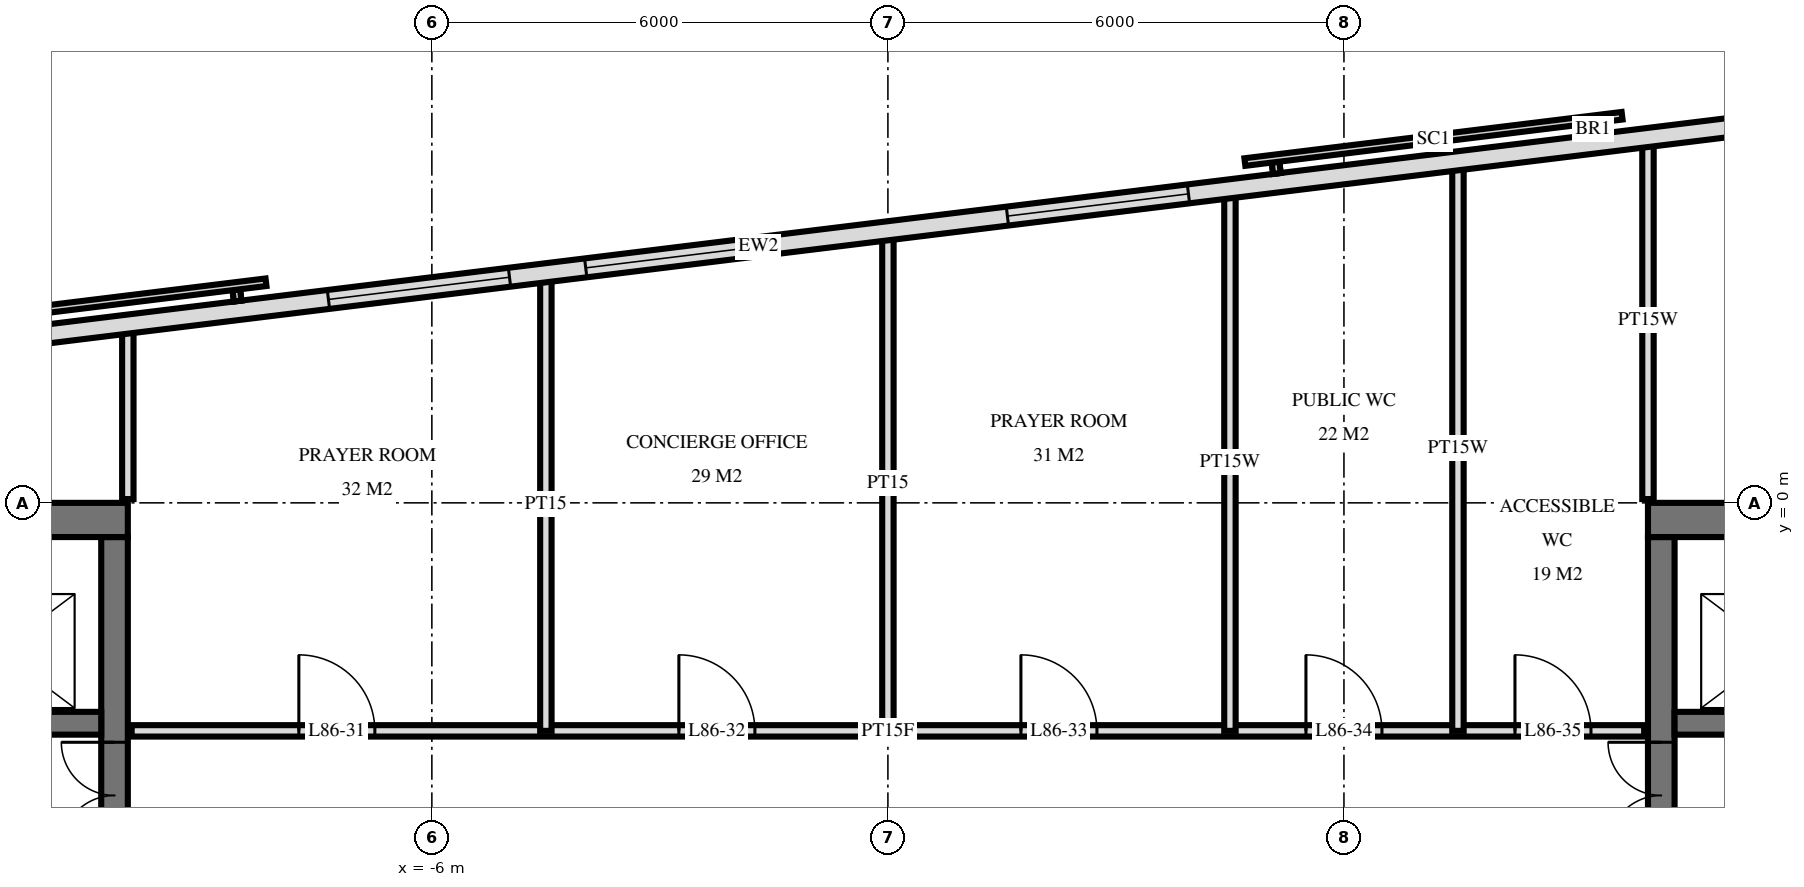
"""IFC4 building model, lengths in metres.
Left out: names, types, materials, properties, quantities, classifications, styles, units other than length and angle.
Written with IfcOpenShell. Run it as: python <this file> out.ifc"""

import sys

from ifc_helpers import new_model, si_unit, direction, frame, frame_2d, origin, place, context, subcontext, project, spatial, rectangle, extrude, element, fill, save


model = new_model("IFC4")
c1 = context("Model", 3, precision=1e-05, world=origin(), true_north=direction((0.0, 1.0)))
c2 = subcontext(c1, "Body", "Model", "MODEL_VIEW")
j1 = project(units=[si_unit("LENGTHUNIT", "METRE"), si_unit("PLANEANGLEUNIT", "RADIAN")], contexts=[c1])
p1 = place(None, origin())
s1 = spatial("IfcSite", under=j1, at=p1, CompositionType="ELEMENT")
p2 = place(p1, origin())
s2 = spatial("IfcBuilding", under=s1, at=p2, CompositionType="ELEMENT")
p3 = place(p2, frame((0.0, 0.0, 326.6)))
s3 = spatial("IfcBuildingStorey", under=s2, at=p3, CompositionType="ELEMENT", Elevation=326.6)
p4 = place(p3, frame((-19.5, -0.225, 0.0), z_axis=(0.0, 0.0, 1.0), x_axis=(1.0, 0.0, 0.0)))
e1 = element("IfcWall", 1, at=p4, inside=s3, PredefinedType="SHEAR", context=c2, shape_type="SweptSolid", body=[
    extrude(rectangle(XDim=9.5, YDim=0.45, at=frame_2d((4.75, 0.0))), origin(), (0.0, 0.0, 1.0), 4.0),
])
p5 = place(p3, frame((-10.175, -14.55, 0.0), z_axis=(0.0, 0.0, 1.0), x_axis=(0.0, 1.0, 0.0)))
e2 = element("IfcWall", 2, at=p5, inside=s3, PredefinedType="SHEAR", context=c2, shape_type="SweptSolid", body=[
    extrude(rectangle(XDim=14.1, YDim=0.35, at=frame_2d((7.05, 0.0))), origin(), (0.0, 0.0, 1.0), 4.0),
])
p6 = place(p5, frame((8.4, 0.0, 0.0)))
e3 = element("IfcOpeningElement", 3, at=p6, cuts=e2, PredefinedType="OPENING", context=c2, shape_type="SweptSolid", body=[
    extrude(rectangle(XDim=1.4, YDim=2.4, at=frame_2d((0.7, 1.2))), frame((0.0, 0.185, 0.0), z_axis=(0.0, -1.0, 0.0), x_axis=(1.0, 0.0, 0.0)), (0.0, 0.0, 1.0), 0.37),
])
p7 = place(p5, frame((10.0, 0.0, 0.0)))
e4 = element("IfcOpeningElement", 4, at=p7, cuts=e2, PredefinedType="OPENING", context=c2, shape_type="SweptSolid", body=[
    extrude(rectangle(XDim=1.4, YDim=2.4, at=frame_2d((0.7, 1.2))), frame((0.0, 0.185, 0.0), z_axis=(0.0, -1.0, 0.0), x_axis=(1.0, 0.0, 0.0)), (0.0, 0.0, 1.0), 0.37),
])
p8 = place(p5, frame((4.0, 0.0, 0.0)))
e5 = element("IfcOpeningElement", 5, at=p8, cuts=e2, PredefinedType="OPENING", context=c2, shape_type="SweptSolid", body=[
    extrude(rectangle(XDim=1.2, YDim=2.1, at=frame_2d((0.6, 1.05))), frame((0.0, 0.185, 0.0), z_axis=(0.0, -1.0, 0.0), x_axis=(1.0, 0.0, 0.0)), (0.0, 0.0, 1.0), 0.37),
])
p9 = place(p3, frame((-19.05, -2.9, 0.0), z_axis=(0.0, 0.0, 1.0), x_axis=(1.0, 0.0, 0.0)))
e6 = element("IfcWall", 6, at=p9, inside=s3, PredefinedType="SHEAR", context=c2, shape_type="SweptSolid", body=[
    extrude(rectangle(XDim=8.7, YDim=0.3, at=frame_2d((4.35, 0.0))), origin(), (0.0, 0.0, 1.0), 4.0),
])
p10 = place(p9, frame((6.8, 0.0, 0.0)))
e7 = element("IfcOpeningElement", 7, at=p10, cuts=e6, PredefinedType="OPENING", context=c2, shape_type="SweptSolid", body=[
    extrude(rectangle(XDim=1.1, YDim=2.1, at=frame_2d((0.55, 1.05))), frame((0.0, 0.16, 0.0), z_axis=(0.0, -1.0, 0.0), x_axis=(1.0, 0.0, 0.0)), (0.0, 0.0, 1.0), 0.32),
])
p11 = place(p9, frame((3.8, 0.0, 0.0)))
e8 = element("IfcOpeningElement", 8, at=p11, cuts=e6, PredefinedType="OPENING", context=c2, shape_type="SweptSolid", body=[
    extrude(rectangle(XDim=1.1, YDim=2.1, at=frame_2d((0.55, 1.05))), frame((0.0, 0.16, 0.0), z_axis=(0.0, -1.0, 0.0), x_axis=(1.0, 0.0, 0.0)), (0.0, 0.0, 1.0), 0.32),
])
p12 = place(p9, frame((0.9, 0.0, 0.0)))
e9 = element("IfcOpeningElement", 9, at=p12, cuts=e6, PredefinedType="OPENING", context=c2, shape_type="SweptSolid", body=[
    extrude(rectangle(XDim=0.9, YDim=2.1, at=frame_2d((0.45, 1.05))), frame((0.0, 0.16, 0.0), z_axis=(0.0, -1.0, 0.0), x_axis=(1.0, 0.0, 0.0)), (0.0, 0.0, 1.0), 0.32),
])
p13 = place(p3, frame((10.0, -0.225, 0.0), z_axis=(0.0, 0.0, 1.0), x_axis=(1.0, 0.0, 0.0)))
e10 = element("IfcWall", 10, at=p13, inside=s3, PredefinedType="SHEAR", context=c2, shape_type="SweptSolid", body=[
    extrude(rectangle(XDim=9.5, YDim=0.45, at=frame_2d((4.75, 0.0))), origin(), (0.0, 0.0, 1.0), 4.0),
])
p14 = place(p3, frame((10.175, -14.55, 0.0), z_axis=(0.0, 0.0, 1.0), x_axis=(0.0, 1.0, 0.0)))
e11 = element("IfcWall", 11, at=p14, inside=s3, PredefinedType="SHEAR", context=c2, shape_type="SweptSolid", body=[
    extrude(rectangle(XDim=14.1, YDim=0.35, at=frame_2d((7.05, 0.0))), origin(), (0.0, 0.0, 1.0), 4.0),
])
p15 = place(p14, frame((8.4, 0.0, 0.0)))
e12 = element("IfcOpeningElement", 12, at=p15, cuts=e11, PredefinedType="OPENING", context=c2, shape_type="SweptSolid", body=[
    extrude(rectangle(XDim=1.4, YDim=2.4, at=frame_2d((0.7, 1.2))), frame((0.0, 0.185, 0.0), z_axis=(0.0, -1.0, 0.0), x_axis=(1.0, 0.0, 0.0)), (0.0, 0.0, 1.0), 0.37),
])
p16 = place(p14, frame((10.0, 0.0, 0.0)))
e13 = element("IfcOpeningElement", 13, at=p16, cuts=e11, PredefinedType="OPENING", context=c2, shape_type="SweptSolid", body=[
    extrude(rectangle(XDim=1.4, YDim=2.4, at=frame_2d((0.7, 1.2))), frame((0.0, 0.185, 0.0), z_axis=(0.0, -1.0, 0.0), x_axis=(1.0, 0.0, 0.0)), (0.0, 0.0, 1.0), 0.37),
])
p17 = place(p14, frame((4.0, 0.0, 0.0)))
e14 = element("IfcOpeningElement", 14, at=p17, cuts=e11, PredefinedType="OPENING", context=c2, shape_type="SweptSolid", body=[
    extrude(rectangle(XDim=1.2, YDim=2.1, at=frame_2d((0.6, 1.05))), frame((0.0, 0.185, 0.0), z_axis=(0.0, -1.0, 0.0), x_axis=(1.0, 0.0, 0.0)), (0.0, 0.0, 1.0), 0.37),
])
p18 = place(p3, frame((10.35, -2.9, 0.0), z_axis=(0.0, 0.0, 1.0), x_axis=(1.0, 0.0, 0.0)))
e15 = element("IfcWall", 15, at=p18, inside=s3, PredefinedType="SHEAR", context=c2, shape_type="SweptSolid", body=[
    extrude(rectangle(XDim=8.7, YDim=0.3, at=frame_2d((4.35, 0.0))), origin(), (0.0, 0.0, 1.0), 4.0),
])
p19 = place(p18, frame((0.8, 0.0, 0.0)))
e16 = element("IfcOpeningElement", 16, at=p19, cuts=e15, PredefinedType="OPENING", context=c2, shape_type="SweptSolid", body=[
    extrude(rectangle(XDim=1.1, YDim=2.1, at=frame_2d((0.55, 1.05))), frame((0.0, 0.16, 0.0), z_axis=(0.0, -1.0, 0.0), x_axis=(1.0, 0.0, 0.0)), (0.0, 0.0, 1.0), 0.32),
])
p20 = place(p18, frame((3.8, 0.0, 0.0)))
e17 = element("IfcOpeningElement", 17, at=p20, cuts=e15, PredefinedType="OPENING", context=c2, shape_type="SweptSolid", body=[
    extrude(rectangle(XDim=1.1, YDim=2.1, at=frame_2d((0.55, 1.05))), frame((0.0, 0.16, 0.0), z_axis=(0.0, -1.0, 0.0), x_axis=(1.0, 0.0, 0.0)), (0.0, 0.0, 1.0), 0.32),
])
p21 = place(p18, frame((6.9, 0.0, 0.0)))
e18 = element("IfcOpeningElement", 18, at=p21, cuts=e15, PredefinedType="OPENING", context=c2, shape_type="SweptSolid", body=[
    extrude(rectangle(XDim=0.9, YDim=2.1, at=frame_2d((0.45, 1.05))), frame((0.0, 0.16, 0.0), z_axis=(0.0, -1.0, 0.0), x_axis=(1.0, 0.0, 0.0)), (0.0, 0.0, 1.0), 0.32),
])
p22 = place(p3, frame((16.138, 5.561, 0.0), z_axis=(0.0, 0.0, 1.0), x_axis=(-0.992546726876, -0.121864658405, 0.0)))
e19 = element("IfcWall", 19, at=p22, inside=s3, PredefinedType="SOLIDWALL", context=c2, shape_type="SweptSolid", body=[
    extrude(rectangle(XDim=35.951, YDim=0.25, at=frame_2d((17.975, 0.0))), origin(), (0.0, 0.0, 1.0), 3.72),
])
p23 = place(p22, frame((12.275, 0.0, 0.0)))
e20 = element("IfcOpeningElement", 20, at=p23, cuts=e19, PredefinedType="OPENING", context=c2, shape_type="SweptSolid", body=[
    extrude(rectangle(XDim=2.4, YDim=2.4, at=frame_2d((1.2, 1.2))), frame((0.0, 0.135, 0.0), z_axis=(0.0, -1.0, 0.0), x_axis=(1.0, 0.0, 0.0)), (0.0, 0.0, 1.0), 0.27),
])
p24 = place(p22, frame((17.865, 0.0, 0.0)))
e21 = element("IfcOpeningElement", 21, at=p24, cuts=e19, PredefinedType="OPENING", context=c2, shape_type="SweptSolid", body=[
    extrude(rectangle(XDim=2.4, YDim=2.4, at=frame_2d((1.2, 1.2))), frame((0.0, 0.135, 0.0), z_axis=(0.0, -1.0, 0.0), x_axis=(1.0, 0.0, 0.0)), (0.0, 0.0, 1.0), 0.27),
])
p25 = place(p22, frame((21.275, 0.0, 0.0)))
e22 = element("IfcOpeningElement", 22, at=p25, cuts=e19, PredefinedType="OPENING", context=c2, shape_type="SweptSolid", body=[
    extrude(rectangle(XDim=2.4, YDim=2.4, at=frame_2d((1.2, 1.2))), frame((0.0, 0.135, 0.0), z_axis=(0.0, -1.0, 0.0), x_axis=(1.0, 0.0, 0.0)), (0.0, 0.0, 1.0), 0.27),
])
p26 = place(p3, frame((10.0, 0.05, 0.0), z_axis=(0.0, 0.0, 1.0), x_axis=(0.0, 1.0, 0.0)))
e23 = element("IfcWall", 23, at=p26, inside=s3, PredefinedType="PLUMBINGWALL", context=c2, shape_type="SweptSolid", body=[
    extrude(rectangle(XDim=4.702, YDim=0.15, at=frame_2d((2.351, 0.0))), origin(), (0.0, 0.0, 1.0), 3.72),
])
p27 = place(p3, frame((7.5, -3.0, 0.0), z_axis=(0.0, 0.0, 1.0), x_axis=(0.0, 1.0, 0.0)))
e24 = element("IfcWall", 24, at=p27, inside=s3, PredefinedType="PLUMBINGWALL", context=c2, shape_type="SweptSolid", body=[
    extrude(rectangle(XDim=7.445, YDim=0.15, at=frame_2d((3.723, 0.0))), origin(), (0.0, 0.0, 1.0), 3.72),
])
p28 = place(p3, frame((4.5, -3.0, 0.0), z_axis=(0.0, 0.0, 1.0), x_axis=(0.0, 1.0, 0.0)))
e25 = element("IfcWall", 25, at=p28, inside=s3, PredefinedType="PLUMBINGWALL", context=c2, shape_type="SweptSolid", body=[
    extrude(rectangle(XDim=7.077, YDim=0.15, at=frame_2d((3.539, 0.0))), origin(), (0.0, 0.0, 1.0), 3.72),
])
p29 = place(p3, frame((0.0, -3.0, 0.0), z_axis=(0.0, 0.0, 1.0), x_axis=(0.0, 1.0, 0.0)))
e26 = element("IfcWall", 26, at=p29, inside=s3, PredefinedType="PARTITIONING", context=c2, shape_type="SweptSolid", body=[
    extrude(rectangle(XDim=6.524, YDim=0.15, at=frame_2d((3.262, 0.0))), origin(), (0.0, 0.0, 1.0), 3.72),
])
p30 = place(p3, frame((-4.5, -3.0, 0.0), z_axis=(0.0, 0.0, 1.0), x_axis=(0.0, 1.0, 0.0)))
e27 = element("IfcWall", 27, at=p30, inside=s3, PredefinedType="PARTITIONING", context=c2, shape_type="SweptSolid", body=[
    extrude(rectangle(XDim=5.972, YDim=0.15, at=frame_2d((2.986, 0.0))), origin(), (0.0, 0.0, 1.0), 3.72),
])
p31 = place(p3, frame((-10.0, 0.05, 0.0), z_axis=(0.0, 0.0, 1.0), x_axis=(0.0, 1.0, 0.0)))
e28 = element("IfcWall", 28, at=p31, inside=s3, PredefinedType="PARTITIONING", context=c2, shape_type="SweptSolid", body=[
    extrude(rectangle(XDim=2.247, YDim=0.15, at=frame_2d((1.123, 0.0))), origin(), (0.0, 0.0, 1.0), 3.72),
])
p32 = place(p3, frame((-9.95, -3.0, 0.0), z_axis=(0.0, 0.0, 1.0), x_axis=(1.0, 0.0, 0.0)))
e29 = element("IfcWall", 29, at=p32, inside=s3, PredefinedType="PARTITIONING", context=c2, shape_type="SweptSolid", body=[
    extrude(rectangle(XDim=19.9, YDim=0.15, at=frame_2d((9.95, 0.0))), origin(), (0.0, 0.0, 1.0), 3.72),
])
p33 = place(p32, frame((2.2, 0.0, 0.0)))
e30 = element("IfcOpeningElement", 30, at=p33, cuts=e29, PredefinedType="OPENING", context=c2, shape_type="SweptSolid", body=[
    extrude(rectangle(XDim=1.0, YDim=2.1, at=frame_2d((0.5, 1.05))), frame((0.0, 0.085, 0.0), z_axis=(0.0, -1.0, 0.0), x_axis=(1.0, 0.0, 0.0)), (0.0, 0.0, 1.0), 0.17),
])
p34 = place(p32, frame((7.2, 0.0, 0.0)))
e31 = element("IfcOpeningElement", 31, at=p34, cuts=e29, PredefinedType="OPENING", context=c2, shape_type="SweptSolid", body=[
    extrude(rectangle(XDim=1.0, YDim=2.1, at=frame_2d((0.5, 1.05))), frame((0.0, 0.085, 0.0), z_axis=(0.0, -1.0, 0.0), x_axis=(1.0, 0.0, 0.0)), (0.0, 0.0, 1.0), 0.17),
])
p35 = place(p32, frame((11.7, 0.0, 0.0)))
e32 = element("IfcOpeningElement", 32, at=p35, cuts=e29, PredefinedType="OPENING", context=c2, shape_type="SweptSolid", body=[
    extrude(rectangle(XDim=1.0, YDim=2.1, at=frame_2d((0.5, 1.05))), frame((0.0, 0.085, 0.0), z_axis=(0.0, -1.0, 0.0), x_axis=(1.0, 0.0, 0.0)), (0.0, 0.0, 1.0), 0.17),
])
p36 = place(p32, frame((15.45, 0.0, 0.0)))
e33 = element("IfcOpeningElement", 33, at=p36, cuts=e29, PredefinedType="OPENING", context=c2, shape_type="SweptSolid", body=[
    extrude(rectangle(XDim=1.0, YDim=2.1, at=frame_2d((0.5, 1.05))), frame((0.0, 0.085, 0.0), z_axis=(0.0, -1.0, 0.0), x_axis=(1.0, 0.0, 0.0)), (0.0, 0.0, 1.0), 0.17),
])
p37 = place(p32, frame((18.2, 0.0, 0.0)))
e34 = element("IfcOpeningElement", 34, at=p37, cuts=e29, PredefinedType="OPENING", context=c2, shape_type="SweptSolid", body=[
    extrude(rectangle(XDim=1.0, YDim=2.1, at=frame_2d((0.5, 1.05))), frame((0.0, 0.085, 0.0), z_axis=(0.0, -1.0, 0.0), x_axis=(1.0, 0.0, 0.0)), (0.0, 0.0, 1.0), 0.17),
])
p38 = place(p23, origin())
e35 = element("IfcWindow", 35, at=p38, inside=s3, PartitioningType="SINGLE_PANEL", PredefinedType="WINDOW", context=c2, shape_type="SweptSolid", body=[
    extrude(rectangle(XDim=2.4, YDim=2.4, at=frame_2d((1.2, 1.2))), frame((0.0, 0.03, 0.0), z_axis=(0.0, -1.0, 0.0), x_axis=(1.0, 0.0, 0.0)), (0.0, 0.0, 1.0), 0.06),
])
fill(e20, e35)
p39 = place(p24, origin())
e36 = element("IfcWindow", 36, at=p39, inside=s3, PartitioningType="SINGLE_PANEL", PredefinedType="WINDOW", context=c2, shape_type="SweptSolid", body=[
    extrude(rectangle(XDim=2.4, YDim=2.4, at=frame_2d((1.2, 1.2))), frame((0.0, 0.03, 0.0), z_axis=(0.0, -1.0, 0.0), x_axis=(1.0, 0.0, 0.0)), (0.0, 0.0, 1.0), 0.06),
])
fill(e21, e36)
p40 = place(p25, origin())
e37 = element("IfcWindow", 37, at=p40, inside=s3, PartitioningType="SINGLE_PANEL", PredefinedType="WINDOW", context=c2, shape_type="SweptSolid", body=[
    extrude(rectangle(XDim=2.4, YDim=2.4, at=frame_2d((1.2, 1.2))), frame((0.0, 0.03, 0.0), z_axis=(0.0, -1.0, 0.0), x_axis=(1.0, 0.0, 0.0)), (0.0, 0.0, 1.0), 0.06),
])
fill(e22, e37)
p41 = place(p7, origin())
e38 = element("IfcDoor", 38, at=p41, inside=s3, OperationType="DOUBLE_DOOR_SINGLE_SWING", PredefinedType="DOOR", context=c2, shape_type="SweptSolid", body=[
    extrude(rectangle(XDim=1.4, YDim=2.4, at=frame_2d((0.7, 1.2))), frame((0.0, 0.025, 0.0), z_axis=(0.0, -1.0, 0.0), x_axis=(1.0, 0.0, 0.0)), (0.0, 0.0, 1.0), 0.05),
])
fill(e4, e38)
p42 = place(p16, origin())
e39 = element("IfcDoor", 39, at=p42, inside=s3, OperationType="DOUBLE_DOOR_SINGLE_SWING", PredefinedType="DOOR", context=c2, shape_type="SweptSolid", body=[
    extrude(rectangle(XDim=1.4, YDim=2.4, at=frame_2d((0.7, 1.2))), frame((0.0, 0.025, 0.0), z_axis=(0.0, -1.0, 0.0), x_axis=(1.0, 0.0, 0.0)), (0.0, 0.0, 1.0), 0.05),
])
fill(e13, e39)
p43 = place(p33, origin())
e40 = element("IfcDoor", 40, at=p43, inside=s3, OperationType="SINGLE_SWING_RIGHT", PredefinedType="DOOR", context=c2, shape_type="SweptSolid", body=[
    extrude(rectangle(XDim=1.0, YDim=2.1, at=frame_2d((0.5, 1.05))), frame((0.0, 0.025, 0.0), z_axis=(0.0, -1.0, 0.0), x_axis=(1.0, 0.0, 0.0)), (0.0, 0.0, 1.0), 0.05),
])
fill(e30, e40)
p44 = place(p34, origin())
e41 = element("IfcDoor", 41, at=p44, inside=s3, OperationType="SINGLE_SWING_RIGHT", PredefinedType="DOOR", context=c2, shape_type="SweptSolid", body=[
    extrude(rectangle(XDim=1.0, YDim=2.1, at=frame_2d((0.5, 1.05))), frame((0.0, 0.025, 0.0), z_axis=(0.0, -1.0, 0.0), x_axis=(1.0, 0.0, 0.0)), (0.0, 0.0, 1.0), 0.05),
])
fill(e31, e41)
p45 = place(p35, origin())
e42 = element("IfcDoor", 42, at=p45, inside=s3, OperationType="SINGLE_SWING_RIGHT", PredefinedType="DOOR", context=c2, shape_type="SweptSolid", body=[
    extrude(rectangle(XDim=1.0, YDim=2.1, at=frame_2d((0.5, 1.05))), frame((0.0, 0.025, 0.0), z_axis=(0.0, -1.0, 0.0), x_axis=(1.0, 0.0, 0.0)), (0.0, 0.0, 1.0), 0.05),
])
fill(e32, e42)
p46 = place(p36, origin())
e43 = element("IfcDoor", 43, at=p46, inside=s3, OperationType="SINGLE_SWING_RIGHT", PredefinedType="DOOR", context=c2, shape_type="SweptSolid", body=[
    extrude(rectangle(XDim=1.0, YDim=2.1, at=frame_2d((0.5, 1.05))), frame((0.0, 0.025, 0.0), z_axis=(0.0, -1.0, 0.0), x_axis=(1.0, 0.0, 0.0)), (0.0, 0.0, 1.0), 0.05),
])
fill(e33, e43)
p47 = place(p37, origin())
e44 = element("IfcDoor", 44, at=p47, inside=s3, OperationType="SINGLE_SWING_RIGHT", PredefinedType="DOOR", context=c2, shape_type="SweptSolid", body=[
    extrude(rectangle(XDim=1.0, YDim=2.1, at=frame_2d((0.5, 1.05))), frame((0.0, 0.025, 0.0), z_axis=(0.0, -1.0, 0.0), x_axis=(1.0, 0.0, 0.0)), (0.0, 0.0, 1.0), 0.05),
])
fill(e34, e44)
save(model, sys.argv[1])
